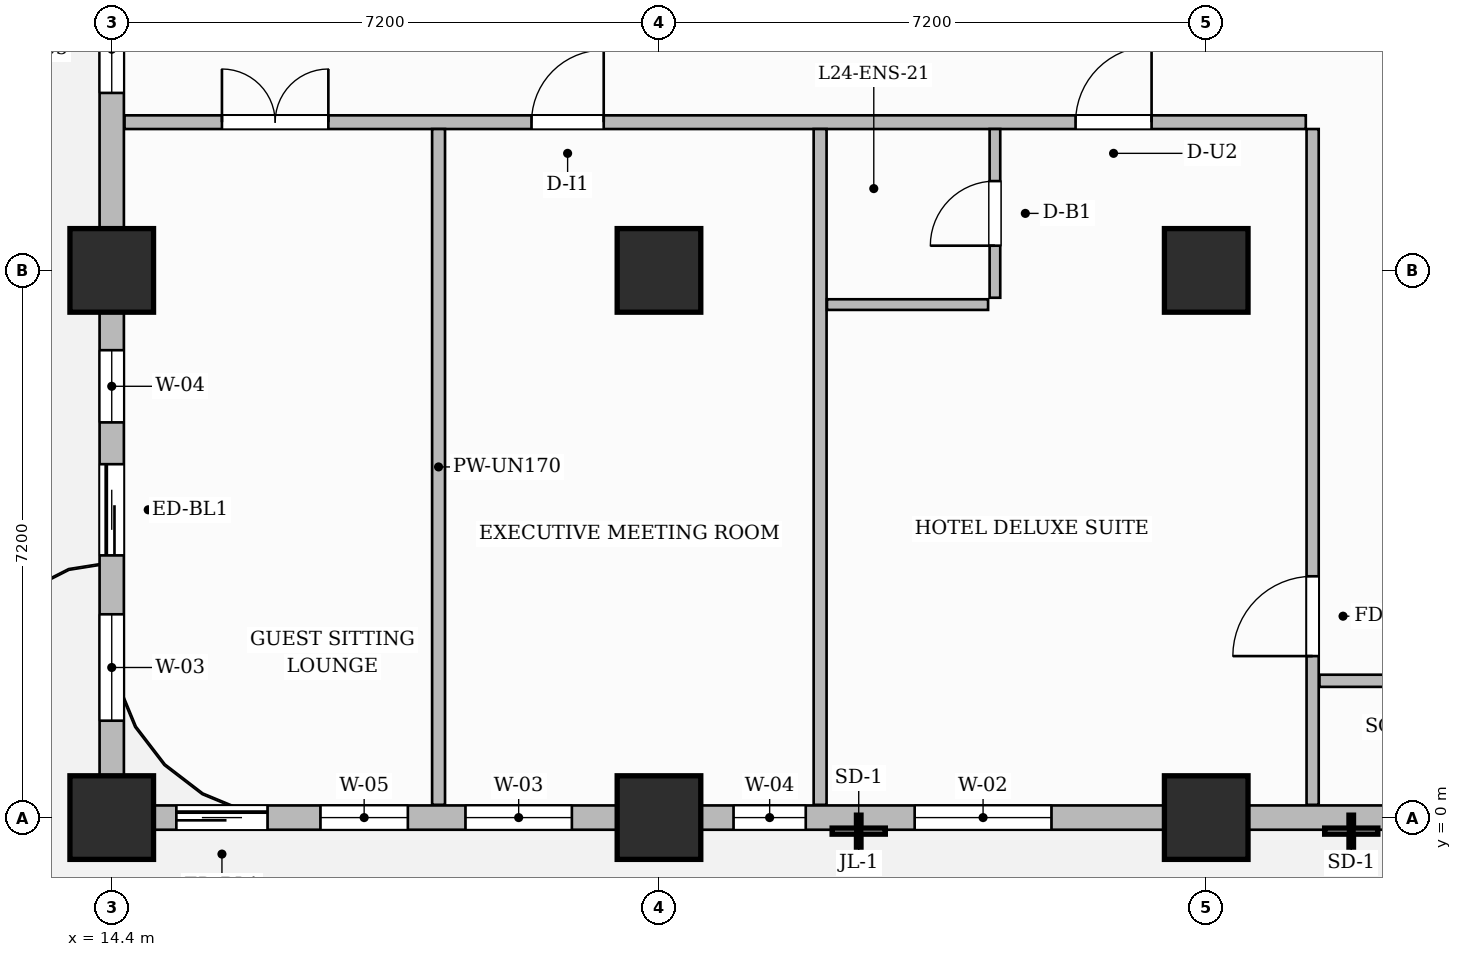
"""IFC4 building model, lengths in metres.
Left out: names, types, materials, properties, quantities, classifications, styles, units other than length and angle.
Written with IfcOpenShell. Run it as: python <this file> out.ifc"""

import sys

from ifc_helpers import new_model, si_unit, direction, frame, frame_2d, origin, origin_2d, place, context, subcontext, project, spatial, rectangle, extrude, source, transform, mapped, element, fill, save


model = new_model("IFC4")
c1 = context("Model", 3, precision=1e-05, world=origin(), true_north=direction((0.0, 1.0)))
c2 = subcontext(c1, "Body", "Model", "MODEL_VIEW")
j1 = project(units=[si_unit("LENGTHUNIT", "METRE"), si_unit("PLANEANGLEUNIT", "RADIAN")], contexts=[c1])
p1 = place(None, origin())
s1 = spatial("IfcSite", under=j1, at=p1, CompositionType="ELEMENT")
p2 = place(p1, origin())
s2 = spatial("IfcBuilding", under=s1, at=p2, CompositionType="ELEMENT")
p3 = place(p2, frame((0.0, 0.0, 99.0)))
s3 = spatial("IfcBuildingStorey", under=s2, at=p3, CompositionType="ELEMENT", Elevation=99.0)
m1 = source(origin(), c2, "Body", "SweptSolid", [
    extrude(rectangle(XDim=1.1, YDim=1.1, at=origin_2d()), origin(), (0.0, 0.0, 1.0), 3.7),
])
for number, where, z_axis, x_axis in (
    (1, (14.4, 0.0, 0.0), (0.0, 0.0, 1.0), (1.0, 0.0, 0.0)),
    (2, (14.4, 7.2, 0.0), (0.0, 0.0, 1.0), (1.0, 0.0, 0.0)),
    (3, (21.6, 0.0, 0.0), (0.0, 0.0, 1.0), (1.0, 0.0, 0.0)),
    (4, (21.6, 7.2, 0.0), (0.0, 0.0, 1.0), (1.0, 0.0, 0.0)),
    (5, (28.8, 0.0, 0.0), (0.0, 0.0, 1.0), (1.0, 0.0, 0.0)),
    (6, (28.8, 7.2, 0.0), (0.0, 0.0, 1.0), (1.0, 0.0, 0.0)),
):
    element("IfcColumn", number, at=place(p3, frame(where, z_axis=z_axis, x_axis=x_axis)), inside=s3, PredefinedType="COLUMN", context=c2, shape_type="MappedRepresentation", body=[
        mapped(m1, transform((0.0, 0.0, 0.0), scale=1.0)),
    ])
p4 = place(p3, frame((14.568, 9.15, 0.0), z_axis=(0.0, 0.0, 1.0), x_axis=(1.0, 0.0, 0.0)))
e7 = element("IfcWall", 7, at=p4, inside=s3, PredefinedType="PARTITIONING", context=c2, shape_type="SweptSolid", body=[
    extrude(rectangle(XDim=15.542, YDim=0.18, at=frame_2d((7.771, 0.0))), origin(), (0.0, 0.0, 1.0), 3.45),
])
p5 = place(p4, frame((1.282, 0.0, 0.0)))
e8 = element("IfcOpeningElement", 8, at=p5, cuts=e7, PredefinedType="OPENING", context=c2, shape_type="SweptSolid", body=[
    extrude(rectangle(XDim=1.4, YDim=2.35, at=frame_2d((0.7, 1.175))), frame((0.0, 0.1, 0.0), z_axis=(0.0, -1.0, 0.0), x_axis=(1.0, 0.0, 0.0)), (0.0, 0.0, 1.0), 0.2),
])
p6 = place(p4, frame((5.355, 0.0, 0.0)))
e9 = element("IfcOpeningElement", 9, at=p6, cuts=e7, PredefinedType="OPENING", context=c2, shape_type="SweptSolid", body=[
    extrude(rectangle(XDim=0.95, YDim=2.15, at=frame_2d((0.475, 1.075))), frame((0.0, 0.1, 0.0), z_axis=(0.0, -1.0, 0.0), x_axis=(1.0, 0.0, 0.0)), (0.0, 0.0, 1.0), 0.2),
])
p7 = place(p4, frame((12.513, 0.0, 0.0)))
e10 = element("IfcOpeningElement", 10, at=p7, cuts=e7, PredefinedType="OPENING", context=c2, shape_type="SweptSolid", body=[
    extrude(rectangle(XDim=1.0, YDim=2.2, at=frame_2d((0.5, 1.1))), frame((0.0, 0.1, 0.0), z_axis=(0.0, -1.0, 0.0), x_axis=(1.0, 0.0, 0.0)), (0.0, 0.0, 1.0), 0.2),
])
p8 = place(p3, frame((30.2, 0.168, 0.0), z_axis=(0.0, 0.0, 1.0), x_axis=(0.0, 1.0, 0.0)))
e11 = element("IfcWall", 11, at=p8, inside=s3, PredefinedType="PARTITIONING", context=c2, shape_type="SweptSolid", body=[
    extrude(rectangle(XDim=8.892, YDim=0.16, at=frame_2d((4.446, 0.0))), origin(), (0.0, 0.0, 1.0), 3.45),
])
p9 = place(p8, frame((1.957, 0.0, 0.0)))
e12 = element("IfcOpeningElement", 12, at=p9, cuts=e11, PredefinedType="OPENING", context=c2, shape_type="SweptSolid", body=[
    extrude(rectangle(XDim=1.05, YDim=2.15, at=frame_2d((0.525, 1.075))), frame((0.0, 0.09, 0.0), z_axis=(0.0, -1.0, 0.0), x_axis=(1.0, 0.0, 0.0)), (0.0, 0.0, 1.0), 0.18),
])
p10 = place(p3, frame((30.29, 1.8, 0.0), z_axis=(0.0, 0.0, 1.0), x_axis=(1.0, 0.0, 0.0)))
e13 = element("IfcWall", 13, at=p10, inside=s3, PredefinedType="PARTITIONING", context=c2, shape_type="SweptSolid", body=[
    extrude(rectangle(XDim=19.37, YDim=0.16, at=frame_2d((9.685, 0.0))), origin(), (0.0, 0.0, 1.0), 3.45),
])
p11 = place(p10, frame((5.213, 0.0, 0.0)))
e14 = element("IfcOpeningElement", 14, at=p11, cuts=e13, PredefinedType="OPENING", context=c2, shape_type="SweptSolid", body=[
    extrude(rectangle(XDim=0.9, YDim=2.15, at=frame_2d((0.45, 1.075))), frame((0.0, 0.09, 0.0), z_axis=(0.0, -1.0, 0.0), x_axis=(1.0, 0.0, 0.0)), (0.0, 0.0, 1.0), 0.18),
])
p12 = place(p10, frame((14.06, 0.0, 0.0)))
e15 = element("IfcOpeningElement", 15, at=p12, cuts=e13, PredefinedType="OPENING", context=c2, shape_type="SweptSolid", body=[
    extrude(rectangle(XDim=0.9, YDim=2.15, at=frame_2d((0.45, 1.075))), frame((0.0, 0.09, 0.0), z_axis=(0.0, -1.0, 0.0), x_axis=(1.0, 0.0, 0.0)), (0.0, 0.0, 1.0), 0.18),
])
for number, where, z_axis, x_axis in (
    (16, (18.7, 0.168, 0.0), (0.0, 0.0, 1.0), (0.0, 1.0, 0.0)),
    (17, (23.72, 0.168, 0.0), (0.0, 0.0, 1.0), (0.0, 1.0, 0.0)),
):
    element("IfcWall", number, at=place(p3, frame(where, z_axis=z_axis, x_axis=x_axis)), inside=s3, PredefinedType="PARTITIONING", context=c2, shape_type="SweptSolid", body=[
        extrude(rectangle(XDim=8.892, YDim=0.17, at=frame_2d((4.446, 0.0))), origin(), (0.0, 0.0, 1.0), 3.45),
    ])
p13 = place(p3, frame((26.02, 6.84, 0.0), z_axis=(0.0, 0.0, 1.0), x_axis=(0.0, 1.0, 0.0)))
e18 = element("IfcWall", 18, at=p13, inside=s3, PredefinedType="PARTITIONING", context=c2, shape_type="SweptSolid", body=[
    extrude(rectangle(XDim=2.22, YDim=0.14, at=frame_2d((1.11, 0.0))), origin(), (0.0, 0.0, 1.0), 3.45),
])
p14 = place(p13, frame((0.685, 0.0, 0.0)))
e19 = element("IfcOpeningElement", 19, at=p14, cuts=e18, PredefinedType="OPENING", context=c2, shape_type="SweptSolid", body=[
    extrude(rectangle(XDim=0.85, YDim=2.1, at=frame_2d((0.425, 1.05))), frame((0.0, 0.08, 0.0), z_axis=(0.0, -1.0, 0.0), x_axis=(1.0, 0.0, 0.0)), (0.0, 0.0, 1.0), 0.16),
])
p15 = place(p3, frame((23.81, 6.75, 0.0), z_axis=(0.0, 0.0, 1.0), x_axis=(1.0, 0.0, 0.0)))
e20 = element("IfcWall", 20, at=p15, inside=s3, PredefinedType="PARTITIONING", context=c2, shape_type="SweptSolid", body=[
    extrude(rectangle(XDim=2.12, YDim=0.14, at=frame_2d((1.06, 0.0))), origin(), (0.0, 0.0, 1.0), 3.45),
])
p16 = place(p3, frame((14.4, 0.0, 0.0), z_axis=(0.0, 0.0, 1.0), x_axis=(1.0, 0.0, 0.0)))
e21 = element("IfcWall", 21, at=p16, inside=s3, PredefinedType="SOLIDWALL", context=c2, shape_type="SweptSolid", body=[
    extrude(rectangle(XDim=43.2, YDim=0.32, at=frame_2d((21.6, 0.0))), origin(), (0.0, 0.0, 1.0), 2.885),
])
p17 = place(p16, frame((0.85, 0.0, 0.0)))
e22 = element("IfcOpeningElement", 22, at=p17, cuts=e21, PredefinedType="OPENING", context=c2, shape_type="SweptSolid", body=[
    extrude(rectangle(XDim=1.2, YDim=2.2, at=frame_2d((0.6, 1.1))), frame((0.0, 0.17, 0.0), z_axis=(0.0, -1.0, 0.0), x_axis=(1.0, 0.0, 0.0)), (0.0, 0.0, 1.0), 0.34),
])
p18 = place(p16, frame((2.746, 0.0, 0.8)))
e23 = element("IfcOpeningElement", 23, at=p18, cuts=e21, PredefinedType="OPENING", context=c2, shape_type="SweptSolid", body=[
    extrude(rectangle(XDim=1.15, YDim=1.8, at=frame_2d((0.575, 0.9))), frame((0.0, 0.17, 0.0), z_axis=(0.0, -1.0, 0.0), x_axis=(1.0, 0.0, 0.0)), (0.0, 0.0, 1.0), 0.34),
])
p19 = place(p16, frame((4.654, 0.0, 0.8)))
e24 = element("IfcOpeningElement", 24, at=p19, cuts=e21, PredefinedType="OPENING", context=c2, shape_type="SweptSolid", body=[
    extrude(rectangle(XDim=1.4, YDim=1.85, at=frame_2d((0.7, 0.925))), frame((0.0, 0.17, 0.0), z_axis=(0.0, -1.0, 0.0), x_axis=(1.0, 0.0, 0.0)), (0.0, 0.0, 1.0), 0.34),
])
p20 = place(p16, frame((8.181, 0.0, 0.8)))
e25 = element("IfcOpeningElement", 25, at=p20, cuts=e21, PredefinedType="OPENING", context=c2, shape_type="SweptSolid", body=[
    extrude(rectangle(XDim=0.95, YDim=1.75, at=frame_2d((0.475, 0.875))), frame((0.0, 0.17, 0.0), z_axis=(0.0, -1.0, 0.0), x_axis=(1.0, 0.0, 0.0)), (0.0, 0.0, 1.0), 0.34),
])
p21 = place(p16, frame((10.564, 0.0, 0.8)))
e26 = element("IfcOpeningElement", 26, at=p21, cuts=e21, PredefinedType="OPENING", context=c2, shape_type="SweptSolid", body=[
    extrude(rectangle(XDim=1.8, YDim=1.85, at=frame_2d((0.9, 0.925))), frame((0.0, 0.17, 0.0), z_axis=(0.0, -1.0, 0.0), x_axis=(1.0, 0.0, 0.0)), (0.0, 0.0, 1.0), 0.34),
])
p22 = place(p16, frame((16.804, 0.0, 0.8)))
e27 = element("IfcOpeningElement", 27, at=p22, cuts=e21, PredefinedType="OPENING", context=c2, shape_type="SweptSolid", body=[
    extrude(rectangle(XDim=1.8, YDim=1.85, at=frame_2d((0.9, 0.925))), frame((0.0, 0.17, 0.0), z_axis=(0.0, -1.0, 0.0), x_axis=(1.0, 0.0, 0.0)), (0.0, 0.0, 1.0), 0.34),
])
p23 = place(p16, frame((22.396, 0.0, 0.8)))
e28 = element("IfcOpeningElement", 28, at=p23, cuts=e21, PredefinedType="OPENING", context=c2, shape_type="SweptSolid", body=[
    extrude(rectangle(XDim=1.8, YDim=1.85, at=frame_2d((0.9, 0.925))), frame((0.0, 0.17, 0.0), z_axis=(0.0, -1.0, 0.0), x_axis=(1.0, 0.0, 0.0)), (0.0, 0.0, 1.0), 0.34),
])
p24 = place(p16, frame((25.629, 0.0, 0.8)))
e29 = element("IfcOpeningElement", 29, at=p24, cuts=e21, PredefinedType="OPENING", context=c2, shape_type="SweptSolid", body=[
    extrude(rectangle(XDim=0.95, YDim=1.75, at=frame_2d((0.475, 0.875))), frame((0.0, 0.17, 0.0), z_axis=(0.0, -1.0, 0.0), x_axis=(1.0, 0.0, 0.0)), (0.0, 0.0, 1.0), 0.34),
])
p25 = place(p16, frame((29.075, 0.0, 0.8)))
e30 = element("IfcOpeningElement", 30, at=p25, cuts=e21, PredefinedType="OPENING", context=c2, shape_type="SweptSolid", body=[
    extrude(rectangle(XDim=1.8, YDim=1.85, at=frame_2d((0.9, 0.925))), frame((0.0, 0.17, 0.0), z_axis=(0.0, -1.0, 0.0), x_axis=(1.0, 0.0, 0.0)), (0.0, 0.0, 1.0), 0.34),
])
p26 = place(p16, frame((32.125, 0.0, 0.8)))
e31 = element("IfcOpeningElement", 31, at=p26, cuts=e21, PredefinedType="OPENING", context=c2, shape_type="SweptSolid", body=[
    extrude(rectangle(XDim=1.8, YDim=1.85, at=frame_2d((0.9, 0.925))), frame((0.0, 0.17, 0.0), z_axis=(0.0, -1.0, 0.0), x_axis=(1.0, 0.0, 0.0)), (0.0, 0.0, 1.0), 0.34),
])
p27 = place(p16, frame((36.946, 0.0, 0.8)))
e32 = element("IfcOpeningElement", 32, at=p27, cuts=e21, PredefinedType="OPENING", context=c2, shape_type="SweptSolid", body=[
    extrude(rectangle(XDim=1.8, YDim=1.85, at=frame_2d((0.9, 0.925))), frame((0.0, 0.17, 0.0), z_axis=(0.0, -1.0, 0.0), x_axis=(1.0, 0.0, 0.0)), (0.0, 0.0, 1.0), 0.34),
])
p28 = place(p16, frame((40.054, 0.0, 0.8)))
e33 = element("IfcOpeningElement", 33, at=p28, cuts=e21, PredefinedType="OPENING", context=c2, shape_type="SweptSolid", body=[
    extrude(rectangle(XDim=1.8, YDim=1.85, at=frame_2d((0.9, 0.925))), frame((0.0, 0.17, 0.0), z_axis=(0.0, -1.0, 0.0), x_axis=(1.0, 0.0, 0.0)), (0.0, 0.0, 1.0), 0.34),
])
p29 = place(p3, frame((14.4, 0.05, 0.0), z_axis=(0.0, 0.0, 1.0), x_axis=(0.0, 1.0, 0.0)))
e34 = element("IfcWall", 34, at=p29, inside=s3, PredefinedType="SOLIDWALL", context=c2, shape_type="SweptSolid", body=[
    extrude(rectangle(XDim=20.6, YDim=0.32, at=frame_2d((10.3, 0.0))), origin(), (0.0, 0.0, 1.0), 2.885),
])
p30 = place(p29, frame((3.4, 0.0, 0.0)))
e35 = element("IfcOpeningElement", 35, at=p30, cuts=e34, PredefinedType="OPENING", context=c2, shape_type="SweptSolid", body=[
    extrude(rectangle(XDim=1.2, YDim=2.2, at=frame_2d((0.6, 1.1))), frame((0.0, 0.17, 0.0), z_axis=(0.0, -1.0, 0.0), x_axis=(1.0, 0.0, 0.0)), (0.0, 0.0, 1.0), 0.34),
])
p31 = place(p29, frame((1.225, 0.0, 0.8)))
e36 = element("IfcOpeningElement", 36, at=p31, cuts=e34, PredefinedType="OPENING", context=c2, shape_type="SweptSolid", body=[
    extrude(rectangle(XDim=1.4, YDim=1.85, at=frame_2d((0.7, 0.925))), frame((0.0, 0.17, 0.0), z_axis=(0.0, -1.0, 0.0), x_axis=(1.0, 0.0, 0.0)), (0.0, 0.0, 1.0), 0.34),
])
p32 = place(p29, frame((5.15, 0.0, 0.8)))
e37 = element("IfcOpeningElement", 37, at=p32, cuts=e34, PredefinedType="OPENING", context=c2, shape_type="SweptSolid", body=[
    extrude(rectangle(XDim=0.95, YDim=1.75, at=frame_2d((0.475, 0.875))), frame((0.0, 0.17, 0.0), z_axis=(0.0, -1.0, 0.0), x_axis=(1.0, 0.0, 0.0)), (0.0, 0.0, 1.0), 0.34),
])
p33 = place(p29, frame((9.485, 0.0, 0.8)))
e38 = element("IfcOpeningElement", 38, at=p33, cuts=e34, PredefinedType="OPENING", context=c2, shape_type="SweptSolid", body=[
    extrude(rectangle(XDim=1.15, YDim=1.8, at=frame_2d((0.575, 0.9))), frame((0.0, 0.17, 0.0), z_axis=(0.0, -1.0, 0.0), x_axis=(1.0, 0.0, 0.0)), (0.0, 0.0, 1.0), 0.34),
])
p34 = place(p29, frame((11.389, 0.0, 0.8)))
e39 = element("IfcOpeningElement", 39, at=p34, cuts=e34, PredefinedType="OPENING", context=c2, shape_type="SweptSolid", body=[
    extrude(rectangle(XDim=1.8, YDim=1.85, at=frame_2d((0.9, 0.925))), frame((0.0, 0.17, 0.0), z_axis=(0.0, -1.0, 0.0), x_axis=(1.0, 0.0, 0.0)), (0.0, 0.0, 1.0), 0.34),
])
p35 = place(p29, frame((16.79, 0.0, 0.8)))
e40 = element("IfcOpeningElement", 40, at=p35, cuts=e34, PredefinedType="OPENING", context=c2, shape_type="SweptSolid", body=[
    extrude(rectangle(XDim=1.8, YDim=1.85, at=frame_2d((0.9, 0.925))), frame((0.0, 0.17, 0.0), z_axis=(0.0, -1.0, 0.0), x_axis=(1.0, 0.0, 0.0)), (0.0, 0.0, 1.0), 0.34),
])
m2 = source(origin(), c2, "Body", "SweptSolid", [
    extrude(rectangle(XDim=1.05, YDim=2.15, at=frame_2d((0.525, 1.075))), frame((0.0, 0.025, 0.0), z_axis=(0.0, -1.0, 0.0), x_axis=(1.0, 0.0, 0.0)), (0.0, 0.0, 1.0), 0.05),
])
p36 = place(p9, origin())
e41 = element("IfcDoor", 41, at=p36, inside=s3, OperationType="SINGLE_SWING_LEFT", PredefinedType="DOOR", context=c2, shape_type="MappedRepresentation", body=[
    mapped(m2, transform((0.0, 0.0, 0.0), scale=1.0)),
])
fill(e12, e41)
m3 = source(origin(), c2, "Body", "SweptSolid", [
    extrude(rectangle(XDim=1.4, YDim=2.35, at=frame_2d((0.7, 1.175))), frame((0.0, 0.025, 0.0), z_axis=(0.0, -1.0, 0.0), x_axis=(1.0, 0.0, 0.0)), (0.0, 0.0, 1.0), 0.05),
])
p37 = place(p5, origin())
e42 = element("IfcDoor", 42, at=p37, inside=s3, OperationType="DOUBLE_DOOR_SINGLE_SWING", PredefinedType="DOOR", context=c2, shape_type="MappedRepresentation", body=[
    mapped(m3, transform((0.0, 0.0, 0.0), scale=1.0)),
])
fill(e8, e42)
m4 = source(origin(), c2, "Body", "SweptSolid", [
    extrude(rectangle(XDim=0.95, YDim=2.15, at=frame_2d((0.475, 1.075))), frame((0.0, 0.025, 0.0), z_axis=(0.0, -1.0, 0.0), x_axis=(1.0, 0.0, 0.0)), (0.0, 0.0, 1.0), 0.05),
])
p38 = place(p6, origin())
e43 = element("IfcDoor", 43, at=p38, inside=s3, OperationType="SINGLE_SWING_RIGHT", PredefinedType="DOOR", context=c2, shape_type="MappedRepresentation", body=[
    mapped(m4, transform((0.0, 0.0, 0.0), scale=1.0)),
])
fill(e9, e43)
m5 = source(origin(), c2, "Body", "SweptSolid", [
    extrude(rectangle(XDim=0.85, YDim=2.1, at=frame_2d((0.425, 1.05))), frame((0.0, 0.025, 0.0), z_axis=(0.0, -1.0, 0.0), x_axis=(1.0, 0.0, 0.0)), (0.0, 0.0, 1.0), 0.05),
])
p39 = place(p14, origin())
e44 = element("IfcDoor", 44, at=p39, inside=s3, OperationType="SINGLE_SWING_LEFT", PredefinedType="DOOR", context=c2, shape_type="MappedRepresentation", body=[
    mapped(m5, transform((0.0, 0.0, 0.0), scale=1.0)),
])
fill(e19, e44)
m6 = source(origin(), c2, "Body", "SweptSolid", [
    extrude(rectangle(XDim=1.0, YDim=2.2, at=frame_2d((0.5, 1.1))), frame((0.0, 0.025, 0.0), z_axis=(0.0, -1.0, 0.0), x_axis=(1.0, 0.0, 0.0)), (0.0, 0.0, 1.0), 0.05),
])
p40 = place(p7, origin())
e45 = element("IfcDoor", 45, at=p40, inside=s3, OperationType="SINGLE_SWING_RIGHT", PredefinedType="DOOR", context=c2, shape_type="MappedRepresentation", body=[
    mapped(m6, transform((0.0, 0.0, 0.0), scale=1.0)),
])
fill(e10, e45)
m7 = source(origin(), c2, "Body", "SweptSolid", [
    extrude(rectangle(XDim=1.2, YDim=2.2, at=frame_2d((0.6, 1.1))), frame((0.0, 0.025, 0.0), z_axis=(0.0, -1.0, 0.0), x_axis=(1.0, 0.0, 0.0)), (0.0, 0.0, 1.0), 0.05),
])
p41 = place(p17, origin())
e46 = element("IfcDoor", 46, at=p41, inside=s3, OperationType="SLIDING_TO_LEFT", PredefinedType="DOOR", context=c2, shape_type="MappedRepresentation", body=[
    mapped(m7, transform((0.0, 0.0, 0.0), scale=1.0)),
])
fill(e22, e46)
p42 = place(p30, origin())
e47 = element("IfcDoor", 47, at=p42, inside=s3, OperationType="SLIDING_TO_LEFT", PredefinedType="DOOR", context=c2, shape_type="MappedRepresentation", body=[
    mapped(m7, transform((0.0, 0.0, 0.0), scale=1.0)),
])
fill(e35, e47)
m8 = source(origin(), c2, "Body", "SweptSolid", [
    extrude(rectangle(XDim=1.15, YDim=1.8, at=frame_2d((0.575, 0.9))), frame((0.0, 0.03, 0.0), z_axis=(0.0, -1.0, 0.0), x_axis=(1.0, 0.0, 0.0)), (0.0, 0.0, 1.0), 0.06),
])
p43 = place(p18, origin())
e48 = element("IfcWindow", 48, at=p43, inside=s3, PartitioningType="SINGLE_PANEL", PredefinedType="WINDOW", context=c2, shape_type="MappedRepresentation", body=[
    mapped(m8, transform((0.0, 0.0, 0.0), scale=1.0)),
])
fill(e23, e48)
m9 = source(origin(), c2, "Body", "SweptSolid", [
    extrude(rectangle(XDim=1.4, YDim=1.85, at=frame_2d((0.7, 0.925))), frame((0.0, 0.03, 0.0), z_axis=(0.0, -1.0, 0.0), x_axis=(1.0, 0.0, 0.0)), (0.0, 0.0, 1.0), 0.06),
])
p44 = place(p19, origin())
e49 = element("IfcWindow", 49, at=p44, inside=s3, PartitioningType="SINGLE_PANEL", PredefinedType="WINDOW", context=c2, shape_type="MappedRepresentation", body=[
    mapped(m9, transform((0.0, 0.0, 0.0), scale=1.0)),
])
fill(e24, e49)
m10 = source(origin(), c2, "Body", "SweptSolid", [
    extrude(rectangle(XDim=0.95, YDim=1.75, at=frame_2d((0.475, 0.875))), frame((0.0, 0.03, 0.0), z_axis=(0.0, -1.0, 0.0), x_axis=(1.0, 0.0, 0.0)), (0.0, 0.0, 1.0), 0.06),
])
p45 = place(p20, origin())
e50 = element("IfcWindow", 50, at=p45, inside=s3, PartitioningType="SINGLE_PANEL", PredefinedType="WINDOW", context=c2, shape_type="MappedRepresentation", body=[
    mapped(m10, transform((0.0, 0.0, 0.0), scale=1.0)),
])
fill(e25, e50)
m11 = source(origin(), c2, "Body", "SweptSolid", [
    extrude(rectangle(XDim=1.8, YDim=1.85, at=frame_2d((0.9, 0.925))), frame((0.0, 0.03, 0.0), z_axis=(0.0, -1.0, 0.0), x_axis=(1.0, 0.0, 0.0)), (0.0, 0.0, 1.0), 0.06),
])
p46 = place(p21, origin())
e51 = element("IfcWindow", 51, at=p46, inside=s3, PartitioningType="DOUBLE_PANEL_VERTICAL", PredefinedType="WINDOW", context=c2, shape_type="MappedRepresentation", body=[
    mapped(m11, transform((0.0, 0.0, 0.0), scale=1.0)),
])
fill(e26, e51)
p47 = place(p31, origin())
e52 = element("IfcWindow", 52, at=p47, inside=s3, PartitioningType="SINGLE_PANEL", PredefinedType="WINDOW", context=c2, shape_type="MappedRepresentation", body=[
    mapped(m9, transform((0.0, 0.0, 0.0), scale=1.0)),
])
fill(e36, e52)
p48 = place(p32, origin())
e53 = element("IfcWindow", 53, at=p48, inside=s3, PartitioningType="SINGLE_PANEL", PredefinedType="WINDOW", context=c2, shape_type="MappedRepresentation", body=[
    mapped(m10, transform((0.0, 0.0, 0.0), scale=1.0)),
])
fill(e37, e53)
p49 = place(p33, origin())
e54 = element("IfcWindow", 54, at=p49, inside=s3, PartitioningType="SINGLE_PANEL", PredefinedType="WINDOW", context=c2, shape_type="MappedRepresentation", body=[
    mapped(m8, transform((0.0, 0.0, 0.0), scale=1.0)),
])
fill(e38, e54)
save(model, sys.argv[1])
